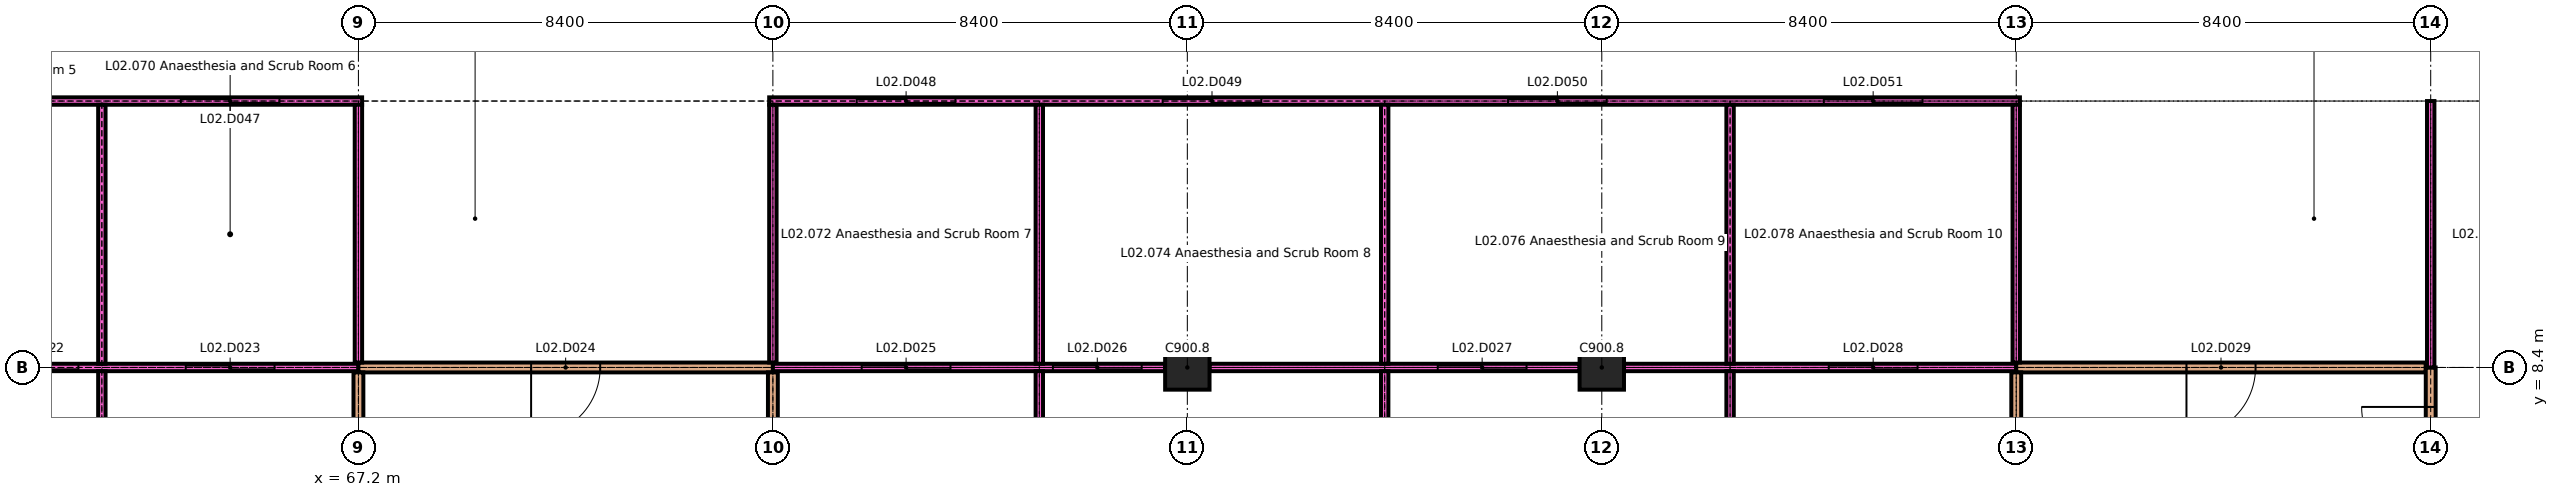
"""IFC4 building model, lengths in metres.
Left out: names, types, materials, properties, quantities, classifications, styles, units other than length and angle.
Written with IfcOpenShell. Run it as: python <this file> out.ifc"""

import sys

from ifc_helpers import new_model, si_unit, direction, frame, frame_2d, origin, origin_2d, place, context, subcontext, project, spatial, rectangle, extrude, element, fill, save


model = new_model("IFC4")
c1 = context("Model", 3, precision=1e-05, world=origin(), true_north=direction((0.0, 1.0)))
c2 = subcontext(c1, "Body", "Model", "MODEL_VIEW")
j1 = project(units=[si_unit("LENGTHUNIT", "METRE"), si_unit("PLANEANGLEUNIT", "RADIAN")], contexts=[c1])
p1 = place(None, origin())
s1 = spatial("IfcSite", under=j1, at=p1, CompositionType="ELEMENT")
p2 = place(p1, origin())
s2 = spatial("IfcBuilding", under=s1, at=p2, CompositionType="ELEMENT")
p3 = place(p2, frame((0.0, 0.0, 8.4)))
s3 = spatial("IfcBuildingStorey", under=s2, at=p3, CompositionType="ELEMENT", Elevation=8.4)
for number, where, z_axis, x_axis in (
    (1, (84.0, 8.4, 0.0), (0.0, 0.0, 1.0), (1.0, 0.0, 0.0)),
    (2, (92.4, 8.4, 0.0), (0.0, 0.0, 1.0), (1.0, 0.0, 0.0)),
):
    element("IfcColumn", number, at=place(p3, frame(where, z_axis=z_axis, x_axis=x_axis)), inside=s3, PredefinedType="COLUMN", context=c2, shape_type="SweptSolid", body=[
        extrude(rectangle(XDim=0.9, YDim=0.9, at=origin_2d()), origin(), (0.0, 0.0, 1.0), 4.2),
    ])
p4 = place(p3, frame((59.25, 8.4, 0.0), z_axis=(0.0, 0.0, 1.0), x_axis=(1.0, 0.0, 0.0)))
e3 = element("IfcWall", 3, at=p4, inside=s3, PredefinedType="PARTITIONING", context=c2, shape_type="SweptSolid", body=[
    extrude(rectangle(XDim=7.95, YDim=0.15, at=frame_2d((3.975, 0.0))), origin(), (0.0, 0.0, 1.0), 4.2),
])
p5 = place(p4, frame((0.475, 0.0, 0.0)))
e4 = element("IfcOpeningElement", 4, at=p5, cuts=e3, PredefinedType="OPENING", context=c2, shape_type="SweptSolid", body=[
    extrude(rectangle(XDim=1.8, YDim=2.4, at=frame_2d((0.9, 1.2))), frame((0.0, 0.085, 0.0), z_axis=(0.0, -1.0, 0.0), x_axis=(1.0, 0.0, 0.0)), (0.0, 0.0, 1.0), 0.17),
])
p6 = place(p4, frame((4.45, 0.0, 0.0)))
e5 = element("IfcOpeningElement", 5, at=p6, cuts=e3, PredefinedType="OPENING", context=c2, shape_type="SweptSolid", body=[
    extrude(rectangle(XDim=1.8, YDim=2.4, at=frame_2d((0.9, 1.2))), frame((0.0, 0.085, 0.0), z_axis=(0.0, -1.0, 0.0), x_axis=(1.0, 0.0, 0.0)), (0.0, 0.0, 1.0), 0.17),
])
p7 = place(p3, frame((67.2, 8.4, 0.0), z_axis=(0.0, 0.0, 1.0), x_axis=(1.0, 0.0, 0.0)))
e6 = element("IfcWall", 6, at=p7, inside=s3, PredefinedType="PARTITIONING", context=c2, shape_type="SweptSolid", body=[
    extrude(rectangle(XDim=8.4, YDim=0.2, at=frame_2d((4.2, 0.0))), origin(), (0.0, 0.0, 1.0), 4.2),
])
p8 = place(p7, frame((3.5, 0.0, 0.0)))
e7 = element("IfcOpeningElement", 7, at=p8, cuts=e6, PredefinedType="OPENING", context=c2, shape_type="SweptSolid", body=[
    extrude(rectangle(XDim=1.4, YDim=2.1, at=frame_2d((0.7, 1.05))), frame((0.0, 0.11, 0.0), z_axis=(0.0, -1.0, 0.0), x_axis=(1.0, 0.0, 0.0)), (0.0, 0.0, 1.0), 0.22),
])
p9 = place(p3, frame((75.6, 8.4, 0.0), z_axis=(0.0, 0.0, 1.0), x_axis=(1.0, 0.0, 0.0)))
e8 = element("IfcWall", 8, at=p9, inside=s3, PredefinedType="PARTITIONING", context=c2, shape_type="SweptSolid", body=[
    extrude(rectangle(XDim=7.95, YDim=0.15, at=frame_2d((3.975, 0.0))), origin(), (0.0, 0.0, 1.0), 4.2),
])
p10 = place(p9, frame((1.8, 0.0, 0.0)))
e9 = element("IfcOpeningElement", 9, at=p10, cuts=e8, PredefinedType="OPENING", context=c2, shape_type="SweptSolid", body=[
    extrude(rectangle(XDim=1.8, YDim=2.4, at=frame_2d((0.9, 1.2))), frame((0.0, 0.085, 0.0), z_axis=(0.0, -1.0, 0.0), x_axis=(1.0, 0.0, 0.0)), (0.0, 0.0, 1.0), 0.17),
])
p11 = place(p9, frame((5.675, 0.0, 0.0)))
e10 = element("IfcOpeningElement", 10, at=p11, cuts=e8, PredefinedType="OPENING", context=c2, shape_type="SweptSolid", body=[
    extrude(rectangle(XDim=1.8, YDim=2.4, at=frame_2d((0.9, 1.2))), frame((0.0, 0.085, 0.0), z_axis=(0.0, -1.0, 0.0), x_axis=(1.0, 0.0, 0.0)), (0.0, 0.0, 1.0), 0.17),
])
p12 = place(p3, frame((84.45, 8.4, 0.0), z_axis=(0.0, 0.0, 1.0), x_axis=(1.0, 0.0, 0.0)))
e11 = element("IfcWall", 11, at=p12, inside=s3, PredefinedType="PARTITIONING", context=c2, shape_type="SweptSolid", body=[
    extrude(rectangle(XDim=7.5, YDim=0.15, at=frame_2d((3.75, 0.0))), origin(), (0.0, 0.0, 1.0), 4.2),
])
p13 = place(p12, frame((4.625, 0.0, 0.0)))
e12 = element("IfcOpeningElement", 12, at=p13, cuts=e11, PredefinedType="OPENING", context=c2, shape_type="SweptSolid", body=[
    extrude(rectangle(XDim=1.8, YDim=2.4, at=frame_2d((0.9, 1.2))), frame((0.0, 0.085, 0.0), z_axis=(0.0, -1.0, 0.0), x_axis=(1.0, 0.0, 0.0)), (0.0, 0.0, 1.0), 0.17),
])
p14 = place(p3, frame((92.85, 8.4, 0.0), z_axis=(0.0, 0.0, 1.0), x_axis=(1.0, 0.0, 0.0)))
e13 = element("IfcWall", 13, at=p14, inside=s3, PredefinedType="PARTITIONING", context=c2, shape_type="SweptSolid", body=[
    extrude(rectangle(XDim=7.95, YDim=0.15, at=frame_2d((3.975, 0.0))), origin(), (0.0, 0.0, 1.0), 4.2),
])
p15 = place(p14, frame((4.15, 0.0, 0.0)))
e14 = element("IfcOpeningElement", 14, at=p15, cuts=e13, PredefinedType="OPENING", context=c2, shape_type="SweptSolid", body=[
    extrude(rectangle(XDim=1.8, YDim=2.4, at=frame_2d((0.9, 1.2))), frame((0.0, 0.085, 0.0), z_axis=(0.0, -1.0, 0.0), x_axis=(1.0, 0.0, 0.0)), (0.0, 0.0, 1.0), 0.17),
])
p16 = place(p3, frame((100.8, 8.4, 0.0), z_axis=(0.0, 0.0, 1.0), x_axis=(1.0, 0.0, 0.0)))
e15 = element("IfcWall", 15, at=p16, inside=s3, PredefinedType="PARTITIONING", context=c2, shape_type="SweptSolid", body=[
    extrude(rectangle(XDim=8.3, YDim=0.2, at=frame_2d((4.15, 0.0))), origin(), (0.0, 0.0, 1.0), 4.2),
])
p17 = place(p16, frame((3.45, 0.0, 0.0)))
e16 = element("IfcOpeningElement", 16, at=p17, cuts=e15, PredefinedType="OPENING", context=c2, shape_type="SweptSolid", body=[
    extrude(rectangle(XDim=1.4, YDim=2.1, at=frame_2d((0.7, 1.05))), frame((0.0, 0.11, 0.0), z_axis=(0.0, -1.0, 0.0), x_axis=(1.0, 0.0, 0.0)), (0.0, 0.0, 1.0), 0.22),
])
p18 = place(p3, frame((41.925, 13.8, 0.0), z_axis=(0.0, 0.0, 1.0), x_axis=(1.0, 0.0, 0.0)))
e17 = element("IfcWall", 17, at=p18, inside=s3, PredefinedType="PARTITIONING", context=c2, shape_type="SweptSolid", body=[
    extrude(rectangle(XDim=25.35, YDim=0.15, at=frame_2d((12.675, 0.0))), origin(), (0.0, 0.0, 1.0), 4.2),
])
p19 = place(p18, frame((1.575, 0.0, 0.0)))
e18 = element("IfcOpeningElement", 18, at=p19, cuts=e17, PredefinedType="OPENING", context=c2, shape_type="SweptSolid", body=[
    extrude(rectangle(XDim=2.0, YDim=2.4, at=frame_2d((1.0, 1.2))), frame((0.0, 0.085, 0.0), z_axis=(0.0, -1.0, 0.0), x_axis=(1.0, 0.0, 0.0)), (0.0, 0.0, 1.0), 0.17),
])
p20 = place(p18, frame((6.575, 0.0, 0.0)))
e19 = element("IfcOpeningElement", 19, at=p20, cuts=e17, PredefinedType="OPENING", context=c2, shape_type="SweptSolid", body=[
    extrude(rectangle(XDim=2.0, YDim=2.4, at=frame_2d((1.0, 1.2))), frame((0.0, 0.085, 0.0), z_axis=(0.0, -1.0, 0.0), x_axis=(1.0, 0.0, 0.0)), (0.0, 0.0, 1.0), 0.17),
])
p21 = place(p18, frame((11.575, 0.0, 0.0)))
e20 = element("IfcOpeningElement", 20, at=p21, cuts=e17, PredefinedType="OPENING", context=c2, shape_type="SweptSolid", body=[
    extrude(rectangle(XDim=2.0, YDim=2.4, at=frame_2d((1.0, 1.2))), frame((0.0, 0.085, 0.0), z_axis=(0.0, -1.0, 0.0), x_axis=(1.0, 0.0, 0.0)), (0.0, 0.0, 1.0), 0.17),
])
p22 = place(p18, frame((16.575, 0.0, 0.0)))
e21 = element("IfcOpeningElement", 21, at=p22, cuts=e17, PredefinedType="OPENING", context=c2, shape_type="SweptSolid", body=[
    extrude(rectangle(XDim=2.0, YDim=2.4, at=frame_2d((1.0, 1.2))), frame((0.0, 0.085, 0.0), z_axis=(0.0, -1.0, 0.0), x_axis=(1.0, 0.0, 0.0)), (0.0, 0.0, 1.0), 0.17),
])
p23 = place(p18, frame((21.675, 0.0, 0.0)))
e22 = element("IfcOpeningElement", 22, at=p23, cuts=e17, PredefinedType="OPENING", context=c2, shape_type="SweptSolid", body=[
    extrude(rectangle(XDim=2.0, YDim=2.4, at=frame_2d((1.0, 1.2))), frame((0.0, 0.085, 0.0), z_axis=(0.0, -1.0, 0.0), x_axis=(1.0, 0.0, 0.0)), (0.0, 0.0, 1.0), 0.17),
])
p24 = place(p3, frame((75.525, 13.8, 0.0), z_axis=(0.0, 0.0, 1.0), x_axis=(1.0, 0.0, 0.0)))
e23 = element("IfcWall", 23, at=p24, inside=s3, PredefinedType="PARTITIONING", context=c2, shape_type="SweptSolid", body=[
    extrude(rectangle(XDim=25.35, YDim=0.15, at=frame_2d((12.675, 0.0))), origin(), (0.0, 0.0, 1.0), 4.2),
])
p25 = place(p24, frame((1.775, 0.0, 0.0)))
e24 = element("IfcOpeningElement", 24, at=p25, cuts=e23, PredefinedType="OPENING", context=c2, shape_type="SweptSolid", body=[
    extrude(rectangle(XDim=2.0, YDim=2.4, at=frame_2d((1.0, 1.2))), frame((0.0, 0.085, 0.0), z_axis=(0.0, -1.0, 0.0), x_axis=(1.0, 0.0, 0.0)), (0.0, 0.0, 1.0), 0.17),
])
p26 = place(p24, frame((7.975, 0.0, 0.0)))
e25 = element("IfcOpeningElement", 25, at=p26, cuts=e23, PredefinedType="OPENING", context=c2, shape_type="SweptSolid", body=[
    extrude(rectangle(XDim=2.0, YDim=2.4, at=frame_2d((1.0, 1.2))), frame((0.0, 0.085, 0.0), z_axis=(0.0, -1.0, 0.0), x_axis=(1.0, 0.0, 0.0)), (0.0, 0.0, 1.0), 0.17),
])
p27 = place(p24, frame((14.975, 0.0, 0.0)))
e26 = element("IfcOpeningElement", 26, at=p27, cuts=e23, PredefinedType="OPENING", context=c2, shape_type="SweptSolid", body=[
    extrude(rectangle(XDim=2.0, YDim=2.4, at=frame_2d((1.0, 1.2))), frame((0.0, 0.085, 0.0), z_axis=(0.0, -1.0, 0.0), x_axis=(1.0, 0.0, 0.0)), (0.0, 0.0, 1.0), 0.17),
])
p28 = place(p24, frame((21.375, 0.0, 0.0)))
e27 = element("IfcOpeningElement", 27, at=p28, cuts=e23, PredefinedType="OPENING", context=c2, shape_type="SweptSolid", body=[
    extrude(rectangle(XDim=2.0, YDim=2.4, at=frame_2d((1.0, 1.2))), frame((0.0, 0.085, 0.0), z_axis=(0.0, -1.0, 0.0), x_axis=(1.0, 0.0, 0.0)), (0.0, 0.0, 1.0), 0.17),
])
p29 = place(p3, frame((62.0, 0.15, 0.0), z_axis=(0.0, 0.0, 1.0), x_axis=(0.0, 1.0, 0.0)))
e28 = element("IfcWall", 28, at=p29, inside=s3, PredefinedType="PARTITIONING", context=c2, shape_type="SweptSolid", body=[
    extrude(rectangle(XDim=8.175, YDim=0.15, at=frame_2d((4.087, 0.0))), origin(), (0.0, 0.0, 1.0), 4.2),
])
p30 = place(p3, frame((62.0, 8.475, 0.0), z_axis=(0.0, 0.0, 1.0), x_axis=(0.0, 1.0, 0.0)))
e29 = element("IfcWall", 29, at=p30, inside=s3, PredefinedType="PARTITIONING", context=c2, shape_type="SweptSolid", body=[
    extrude(rectangle(XDim=5.25, YDim=0.15, at=frame_2d((2.625, 0.0))), origin(), (0.0, 0.0, 1.0), 4.2),
])
p31 = place(p3, frame((67.2, 3.6, 0.0), z_axis=(0.0, 0.0, 1.0), x_axis=(0.0, 1.0, 0.0)))
e30 = element("IfcWall", 30, at=p31, inside=s3, PredefinedType="PARTITIONING", context=c2, shape_type="SweptSolid", body=[
    extrude(rectangle(XDim=4.7, YDim=0.2, at=frame_2d((2.35, 0.0))), origin(), (0.0, 0.0, 1.0), 4.2),
])
p32 = place(p3, frame((67.2, 8.5, 0.0), z_axis=(0.0, 0.0, 1.0), x_axis=(0.0, 1.0, 0.0)))
e31 = element("IfcWall", 31, at=p32, inside=s3, PredefinedType="PARTITIONING", context=c2, shape_type="SweptSolid", body=[
    extrude(rectangle(XDim=5.225, YDim=0.15, at=frame_2d((2.613, 0.0))), origin(), (0.0, 0.0, 1.0), 4.2),
])
p33 = place(p3, frame((75.6, 3.6, 0.0), z_axis=(0.0, 0.0, 1.0), x_axis=(0.0, 1.0, 0.0)))
e32 = element("IfcWall", 32, at=p33, inside=s3, PredefinedType="PARTITIONING", context=c2, shape_type="SweptSolid", body=[
    extrude(rectangle(XDim=4.7, YDim=0.2, at=frame_2d((2.35, 0.0))), origin(), (0.0, 0.0, 1.0), 4.2),
])
p34 = place(p3, frame((75.6, 8.5, 0.0), z_axis=(0.0, 0.0, 1.0), x_axis=(0.0, 1.0, 0.0)))
e33 = element("IfcWall", 33, at=p34, inside=s3, PredefinedType="PARTITIONING", context=c2, shape_type="SweptSolid", body=[
    extrude(rectangle(XDim=5.225, YDim=0.15, at=frame_2d((2.613, 0.0))), origin(), (0.0, 0.0, 1.0), 4.2),
])
p35 = place(p3, frame((81.0, 0.15, 0.0), z_axis=(0.0, 0.0, 1.0), x_axis=(0.0, 1.0, 0.0)))
e34 = element("IfcWall", 34, at=p35, inside=s3, PredefinedType="PARTITIONING", context=c2, shape_type="SweptSolid", body=[
    extrude(rectangle(XDim=8.175, YDim=0.15, at=frame_2d((4.087, 0.0))), origin(), (0.0, 0.0, 1.0), 4.2),
])
p36 = place(p3, frame((81.0, 8.475, 0.0), z_axis=(0.0, 0.0, 1.0), x_axis=(0.0, 1.0, 0.0)))
e35 = element("IfcWall", 35, at=p36, inside=s3, PredefinedType="PARTITIONING", context=c2, shape_type="SweptSolid", body=[
    extrude(rectangle(XDim=5.25, YDim=0.15, at=frame_2d((2.625, 0.0))), origin(), (0.0, 0.0, 1.0), 4.2),
])
p37 = place(p3, frame((88.0, 0.15, 0.0), z_axis=(0.0, 0.0, 1.0), x_axis=(0.0, 1.0, 0.0)))
e36 = element("IfcWall", 36, at=p37, inside=s3, PredefinedType="PARTITIONING", context=c2, shape_type="SweptSolid", body=[
    extrude(rectangle(XDim=8.175, YDim=0.15, at=frame_2d((4.087, 0.0))), origin(), (0.0, 0.0, 1.0), 4.2),
])
p38 = place(p3, frame((88.0, 8.475, 0.0), z_axis=(0.0, 0.0, 1.0), x_axis=(0.0, 1.0, 0.0)))
e37 = element("IfcWall", 37, at=p38, inside=s3, PredefinedType="PARTITIONING", context=c2, shape_type="SweptSolid", body=[
    extrude(rectangle(XDim=5.25, YDim=0.15, at=frame_2d((2.625, 0.0))), origin(), (0.0, 0.0, 1.0), 4.2),
])
p39 = place(p3, frame((95.0, 0.15, 0.0), z_axis=(0.0, 0.0, 1.0), x_axis=(0.0, 1.0, 0.0)))
e38 = element("IfcWall", 38, at=p39, inside=s3, PredefinedType="PARTITIONING", context=c2, shape_type="SweptSolid", body=[
    extrude(rectangle(XDim=8.175, YDim=0.15, at=frame_2d((4.087, 0.0))), origin(), (0.0, 0.0, 1.0), 4.2),
])
p40 = place(p3, frame((95.0, 8.475, 0.0), z_axis=(0.0, 0.0, 1.0), x_axis=(0.0, 1.0, 0.0)))
e39 = element("IfcWall", 39, at=p40, inside=s3, PredefinedType="PARTITIONING", context=c2, shape_type="SweptSolid", body=[
    extrude(rectangle(XDim=5.25, YDim=0.15, at=frame_2d((2.625, 0.0))), origin(), (0.0, 0.0, 1.0), 4.2),
])
p41 = place(p3, frame((100.8, 3.6, 0.0), z_axis=(0.0, 0.0, 1.0), x_axis=(0.0, 1.0, 0.0)))
e40 = element("IfcWall", 40, at=p41, inside=s3, PredefinedType="PARTITIONING", context=c2, shape_type="SweptSolid", body=[
    extrude(rectangle(XDim=4.7, YDim=0.2, at=frame_2d((2.35, 0.0))), origin(), (0.0, 0.0, 1.0), 4.2),
])
p42 = place(p3, frame((100.8, 8.5, 0.0), z_axis=(0.0, 0.0, 1.0), x_axis=(0.0, 1.0, 0.0)))
e41 = element("IfcWall", 41, at=p42, inside=s3, PredefinedType="PARTITIONING", context=c2, shape_type="SweptSolid", body=[
    extrude(rectangle(XDim=5.225, YDim=0.15, at=frame_2d((2.613, 0.0))), origin(), (0.0, 0.0, 1.0), 4.2),
])
p43 = place(p3, frame((109.2, 3.6, 0.0), z_axis=(0.0, 0.0, 1.0), x_axis=(0.0, 1.0, 0.0)))
e42 = element("IfcWall", 42, at=p43, inside=s3, PredefinedType="PARTITIONING", context=c2, shape_type="SweptSolid", body=[
    extrude(rectangle(XDim=4.8, YDim=0.2, at=frame_2d((2.4, 0.0))), origin(), (0.0, 0.0, 1.0), 4.2),
])
p44 = place(p43, frame((2.6, 0.0, 0.0)))
e43 = element("IfcOpeningElement", 43, at=p44, cuts=e42, PredefinedType="OPENING", context=c2, shape_type="SweptSolid", body=[
    extrude(rectangle(XDim=1.4, YDim=2.1, at=frame_2d((0.7, 1.05))), frame((0.0, 0.11, 0.0), z_axis=(0.0, -1.0, 0.0), x_axis=(1.0, 0.0, 0.0)), (0.0, 0.0, 1.0), 0.22),
])
p45 = place(p3, frame((109.2, 8.4, 0.0), z_axis=(0.0, 0.0, 1.0), x_axis=(0.0, 1.0, 0.0)))
e44 = element("IfcWall", 44, at=p45, inside=s3, PredefinedType="PARTITIONING", context=c2, shape_type="SweptSolid", body=[
    extrude(rectangle(XDim=5.4, YDim=0.15, at=frame_2d((2.7, 0.0))), origin(), (0.0, 0.0, 1.0), 4.2),
])
p46 = place(p5, origin())
e45 = element("IfcDoor", 45, at=p46, inside=s3, OperationType="DOUBLE_DOOR_SLIDING", PredefinedType="DOOR", context=c2, shape_type="SweptSolid", body=[
    extrude(rectangle(XDim=1.8, YDim=2.4, at=frame_2d((0.9, 1.2))), frame((0.0, 0.045, 0.0), z_axis=(0.0, -1.0, 0.0), x_axis=(1.0, 0.0, 0.0)), (0.0, 0.0, 1.0), 0.09),
])
fill(e4, e45)
p47 = place(p6, origin())
e46 = element("IfcDoor", 46, at=p47, inside=s3, OperationType="DOUBLE_DOOR_SLIDING", PredefinedType="DOOR", context=c2, shape_type="SweptSolid", body=[
    extrude(rectangle(XDim=1.8, YDim=2.4, at=frame_2d((0.9, 1.2))), frame((0.0, 0.045, 0.0), z_axis=(0.0, -1.0, 0.0), x_axis=(1.0, 0.0, 0.0)), (0.0, 0.0, 1.0), 0.09),
])
fill(e5, e46)
p48 = place(p8, origin())
e47 = element("IfcDoor", 47, at=p48, inside=s3, OperationType="SINGLE_SWING_LEFT", PredefinedType="DOOR", context=c2, shape_type="SweptSolid", body=[
    extrude(rectangle(XDim=1.4, YDim=2.1, at=frame_2d((0.7, 1.05))), frame((0.0, 0.025, 0.0), z_axis=(0.0, -1.0, 0.0), x_axis=(1.0, 0.0, 0.0)), (0.0, 0.0, 1.0), 0.05),
])
fill(e7, e47)
p49 = place(p10, origin())
e48 = element("IfcDoor", 48, at=p49, inside=s3, OperationType="DOUBLE_DOOR_SLIDING", PredefinedType="DOOR", context=c2, shape_type="SweptSolid", body=[
    extrude(rectangle(XDim=1.8, YDim=2.4, at=frame_2d((0.9, 1.2))), frame((0.0, 0.045, 0.0), z_axis=(0.0, -1.0, 0.0), x_axis=(1.0, 0.0, 0.0)), (0.0, 0.0, 1.0), 0.09),
])
fill(e9, e48)
p50 = place(p11, origin())
e49 = element("IfcDoor", 49, at=p50, inside=s3, OperationType="DOUBLE_DOOR_SLIDING", PredefinedType="DOOR", context=c2, shape_type="SweptSolid", body=[
    extrude(rectangle(XDim=1.8, YDim=2.4, at=frame_2d((0.9, 1.2))), frame((0.0, 0.045, 0.0), z_axis=(0.0, -1.0, 0.0), x_axis=(1.0, 0.0, 0.0)), (0.0, 0.0, 1.0), 0.09),
])
fill(e10, e49)
p51 = place(p13, origin())
e50 = element("IfcDoor", 50, at=p51, inside=s3, OperationType="DOUBLE_DOOR_SLIDING", PredefinedType="DOOR", context=c2, shape_type="SweptSolid", body=[
    extrude(rectangle(XDim=1.8, YDim=2.4, at=frame_2d((0.9, 1.2))), frame((0.0, 0.045, 0.0), z_axis=(0.0, -1.0, 0.0), x_axis=(1.0, 0.0, 0.0)), (0.0, 0.0, 1.0), 0.09),
])
fill(e12, e50)
p52 = place(p15, origin())
e51 = element("IfcDoor", 51, at=p52, inside=s3, OperationType="DOUBLE_DOOR_SLIDING", PredefinedType="DOOR", context=c2, shape_type="SweptSolid", body=[
    extrude(rectangle(XDim=1.8, YDim=2.4, at=frame_2d((0.9, 1.2))), frame((0.0, 0.045, 0.0), z_axis=(0.0, -1.0, 0.0), x_axis=(1.0, 0.0, 0.0)), (0.0, 0.0, 1.0), 0.09),
])
fill(e14, e51)
p53 = place(p17, origin())
e52 = element("IfcDoor", 52, at=p53, inside=s3, OperationType="SINGLE_SWING_LEFT", PredefinedType="DOOR", context=c2, shape_type="SweptSolid", body=[
    extrude(rectangle(XDim=1.4, YDim=2.1, at=frame_2d((0.7, 1.05))), frame((0.0, 0.025, 0.0), z_axis=(0.0, -1.0, 0.0), x_axis=(1.0, 0.0, 0.0)), (0.0, 0.0, 1.0), 0.05),
])
fill(e16, e52)
p54 = place(p23, origin())
e53 = element("IfcDoor", 53, at=p54, inside=s3, OperationType="DOUBLE_DOOR_SLIDING", PredefinedType="DOOR", context=c2, shape_type="SweptSolid", body=[
    extrude(rectangle(XDim=2.0, YDim=2.4, at=frame_2d((1.0, 1.2))), frame((0.0, 0.045, 0.0), z_axis=(0.0, -1.0, 0.0), x_axis=(1.0, 0.0, 0.0)), (0.0, 0.0, 1.0), 0.09),
])
fill(e22, e53)
p55 = place(p25, origin())
e54 = element("IfcDoor", 54, at=p55, inside=s3, OperationType="DOUBLE_DOOR_SLIDING", PredefinedType="DOOR", context=c2, shape_type="SweptSolid", body=[
    extrude(rectangle(XDim=2.0, YDim=2.4, at=frame_2d((1.0, 1.2))), frame((0.0, 0.045, 0.0), z_axis=(0.0, -1.0, 0.0), x_axis=(1.0, 0.0, 0.0)), (0.0, 0.0, 1.0), 0.09),
])
fill(e24, e54)
p56 = place(p26, origin())
e55 = element("IfcDoor", 55, at=p56, inside=s3, OperationType="DOUBLE_DOOR_SLIDING", PredefinedType="DOOR", context=c2, shape_type="SweptSolid", body=[
    extrude(rectangle(XDim=2.0, YDim=2.4, at=frame_2d((1.0, 1.2))), frame((0.0, 0.045, 0.0), z_axis=(0.0, -1.0, 0.0), x_axis=(1.0, 0.0, 0.0)), (0.0, 0.0, 1.0), 0.09),
])
fill(e25, e55)
p57 = place(p27, origin())
e56 = element("IfcDoor", 56, at=p57, inside=s3, OperationType="DOUBLE_DOOR_SLIDING", PredefinedType="DOOR", context=c2, shape_type="SweptSolid", body=[
    extrude(rectangle(XDim=2.0, YDim=2.4, at=frame_2d((1.0, 1.2))), frame((0.0, 0.045, 0.0), z_axis=(0.0, -1.0, 0.0), x_axis=(1.0, 0.0, 0.0)), (0.0, 0.0, 1.0), 0.09),
])
fill(e26, e56)
p58 = place(p28, origin())
e57 = element("IfcDoor", 57, at=p58, inside=s3, OperationType="DOUBLE_DOOR_SLIDING", PredefinedType="DOOR", context=c2, shape_type="SweptSolid", body=[
    extrude(rectangle(XDim=2.0, YDim=2.4, at=frame_2d((1.0, 1.2))), frame((0.0, 0.045, 0.0), z_axis=(0.0, -1.0, 0.0), x_axis=(1.0, 0.0, 0.0)), (0.0, 0.0, 1.0), 0.09),
])
fill(e27, e57)
p59 = place(p44, origin())
e58 = element("IfcDoor", 58, at=p59, inside=s3, OperationType="SINGLE_SWING_LEFT", PredefinedType="DOOR", context=c2, shape_type="SweptSolid", body=[
    extrude(rectangle(XDim=1.4, YDim=2.1, at=frame_2d((0.7, 1.05))), frame((0.0, 0.03, 0.0), z_axis=(0.0, -1.0, 0.0), x_axis=(1.0, 0.0, 0.0)), (0.0, 0.0, 1.0), 0.06),
])
fill(e43, e58)
save(model, sys.argv[1])
